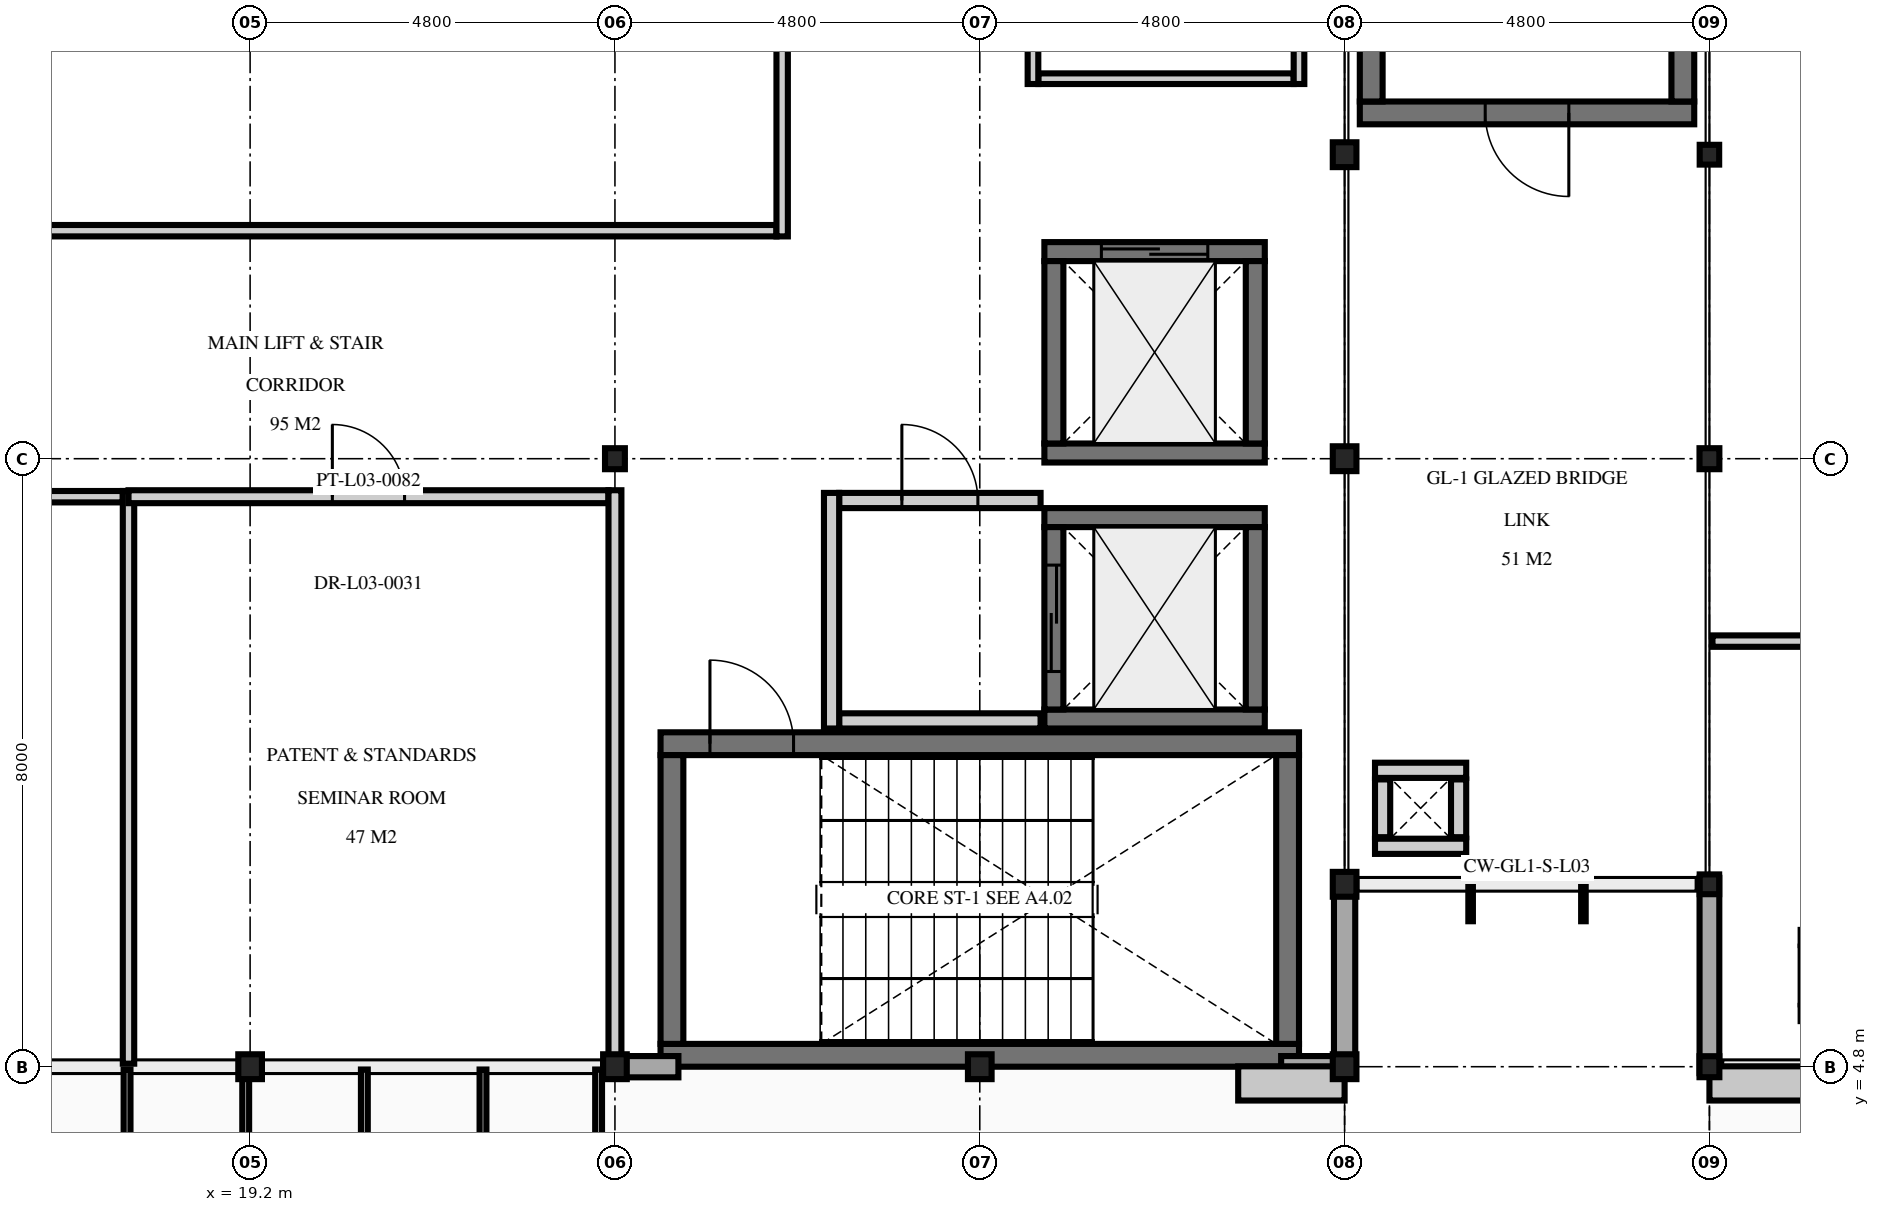
"""IFC4 building model, lengths in metres.
Left out: names, types, materials, properties, quantities, classifications, styles, units other than length and angle.
Written with IfcOpenShell. Run it as: python <this file> out.ifc"""

import sys

from ifc_helpers import new_model, si_unit, direction, frame, frame_2d, origin, origin_2d, place, context, subcontext, project, spatial, rectangle, i_section, extrude, element, fill, save


model = new_model("IFC4")
c1 = context("Model", 3, precision=1e-05, world=origin(), true_north=direction((0.0, 1.0)))
c2 = subcontext(c1, "Body", "Model", "MODEL_VIEW")
j1 = project(units=[si_unit("LENGTHUNIT", "METRE"), si_unit("PLANEANGLEUNIT", "RADIAN")], contexts=[c1])
p1 = place(None, origin())
s1 = spatial("IfcSite", under=j1, at=p1, CompositionType="ELEMENT")
p2 = place(p1, origin())
s2 = spatial("IfcBuilding", under=s1, at=p2, CompositionType="ELEMENT")
p3 = place(p2, frame((0.0, 0.0, 14.1)))
s3 = spatial("IfcBuildingStorey", under=s2, at=p3, CompositionType="ELEMENT", Elevation=14.1)
for number, where, z_axis, x_axis in (
    (1, (19.2, 4.8, 0.0), (0.0, 0.0, 1.0), (1.0, 0.0, 0.0)),
    (2, (24.0, 4.8, 0.0), (0.0, 0.0, 1.0), (1.0, 0.0, 0.0)),
    (3, (28.8, 4.8, 0.0), (0.0, 0.0, 1.0), (1.0, 0.0, 0.0)),
    (4, (33.6, 4.8, 0.0), (0.0, 0.0, 1.0), (1.0, 0.0, 0.0)),
    (5, (33.6, 7.2, 0.0), (0.0, 0.0, 1.0), (1.0, 0.0, 0.0)),
    (6, (33.6, 12.8, 0.0), (0.0, 0.0, 1.0), (1.0, 0.0, 0.0)),
    (7, (33.6, 16.8, 0.0), (0.0, 0.0, 1.0), (1.0, 0.0, 0.0)),
):
    element("IfcColumn", number, at=place(p3, frame(where, z_axis=z_axis, x_axis=x_axis)), inside=s3, PredefinedType="COLUMN", context=c2, shape_type="SweptSolid", body=[
        extrude(i_section(OverallWidth=0.311, OverallDepth=0.327, WebThickness=0.016, FlangeThickness=0.025, at=origin_2d()), origin(), (0.0, 0.0, 1.0), 4.5),
    ])
for number, where, z_axis, x_axis in (
    (8, (24.0, 12.8, 0.0), (0.0, 0.0, 1.0), (1.0, 0.0, 0.0)),
    (9, (38.4, 4.8, 0.0), (0.0, 0.0, 1.0), (1.0, 0.0, 0.0)),
    (10, (38.4, 12.8, 0.0), (0.0, 0.0, 1.0), (1.0, 0.0, 0.0)),
):
    element("IfcColumn", number, at=place(p3, frame(where, z_axis=z_axis, x_axis=x_axis)), inside=s3, PredefinedType="COLUMN", context=c2, shape_type="SweptSolid", body=[
        extrude(i_section(OverallWidth=0.261, OverallDepth=0.276, WebThickness=0.015, FlangeThickness=0.025, at=origin_2d()), origin(), (0.0, 0.0, 1.0), 4.5),
    ])
for number, where, z_axis, x_axis in (
    (11, (38.4, 7.2, 0.0), (0.0, 0.0, 1.0), (1.0, 0.0, 0.0)),
    (12, (38.4, 16.8, 0.0), (0.0, 0.0, 1.0), (1.0, 0.0, 0.0)),
):
    element("IfcColumn", number, at=place(p3, frame(where, z_axis=z_axis, x_axis=x_axis)), inside=s3, PredefinedType="COLUMN", context=c2, shape_type="SweptSolid", body=[
        extrude(i_section(OverallWidth=0.256, OverallDepth=0.26, WebThickness=0.01, FlangeThickness=0.017, at=origin_2d()), origin(), (0.0, 0.0, 1.0), 4.5),
    ])
p4 = place(p3, frame((33.0, 4.95, 0.0), z_axis=(0.0, 0.0, 1.0), x_axis=(-1.0, 0.0, 0.0)))
e13 = element("IfcWall", 13, at=p4, inside=s3, PredefinedType="SHEAR", context=c2, shape_type="SweptSolid", body=[
    extrude(rectangle(XDim=8.4, YDim=0.3, at=frame_2d((4.2, 0.0))), origin(), (0.0, 0.0, 1.0), 4.25),
])
p5 = place(p3, frame((24.6, 9.05, 0.0), z_axis=(0.0, 0.0, 1.0), x_axis=(1.0, 0.0, 0.0)))
e14 = element("IfcWall", 14, at=p5, inside=s3, PredefinedType="SHEAR", context=c2, shape_type="SweptSolid", body=[
    extrude(rectangle(XDim=8.4, YDim=0.3, at=frame_2d((4.2, 0.0))), origin(), (0.0, 0.0, 1.0), 4.25),
])
p6 = place(p5, frame((0.65, 0.0, 0.0)))
e15 = element("IfcOpeningElement", 15, at=p6, cuts=e14, PredefinedType="OPENING", context=c2, shape_type="SweptSolid", body=[
    extrude(rectangle(XDim=1.1, YDim=2.2, at=frame_2d((0.55, 1.1))), frame((0.0, 0.16, 0.0), z_axis=(0.0, -1.0, 0.0), x_axis=(1.0, 0.0, 0.0)), (0.0, 0.0, 1.0), 0.32),
])
for number, where, z_axis, x_axis in (
    (16, (24.75, 5.1, 0.0), (0.0, 0.0, 1.0), (0.0, 1.0, 0.0)),
    (17, (32.85, 8.9, 0.0), (0.0, 0.0, 1.0), (0.0, -1.0, 0.0)),
):
    element("IfcWall", number, at=place(p3, frame(where, z_axis=z_axis, x_axis=x_axis)), inside=s3, PredefinedType="SHEAR", context=c2, shape_type="SweptSolid", body=[
        extrude(rectangle(XDim=3.8, YDim=0.3, at=frame_2d((1.9, 0.0))), origin(), (0.0, 0.0, 1.0), 4.25),
    ])
p7 = place(p3, frame((38.2, 17.35, 0.0), z_axis=(0.0, 0.0, 1.0), x_axis=(-1.0, 0.0, 0.0)))
e18 = element("IfcWall", 18, at=p7, inside=s3, PredefinedType="SHEAR", context=c2, shape_type="SweptSolid", body=[
    extrude(rectangle(XDim=4.4, YDim=0.3, at=frame_2d((2.2, 0.0))), origin(), (0.0, 0.0, 1.0), 4.25),
])
p8 = place(p7, frame((1.65, 0.0, 0.0)))
e19 = element("IfcOpeningElement", 19, at=p8, cuts=e18, PredefinedType="OPENING", context=c2, shape_type="SweptSolid", body=[
    extrude(rectangle(XDim=1.1, YDim=2.2, at=frame_2d((0.55, 1.1))), frame((0.0, 0.16, 0.0), z_axis=(0.0, -1.0, 0.0), x_axis=(1.0, 0.0, 0.0)), (0.0, 0.0, 1.0), 0.32),
])
for number, where, z_axis, x_axis in (
    (20, (33.95, 17.5, 0.0), (0.0, 0.0, 1.0), (0.0, 1.0, 0.0)),
    (21, (38.05, 25.3, 0.0), (0.0, 0.0, 1.0), (0.0, -1.0, 0.0)),
):
    element("IfcWall", number, at=place(p3, frame(where, z_axis=z_axis, x_axis=x_axis)), inside=s3, PredefinedType="SHEAR", context=c2, shape_type="SweptSolid", body=[
        extrude(rectangle(XDim=7.8, YDim=0.3, at=frame_2d((3.9, 0.0))), origin(), (0.0, 0.0, 1.0), 4.25),
    ])
for number, where, z_axis, x_axis in (
    (22, (32.55, 9.375, 0.0), (0.0, 0.0, 1.0), (-1.0, 0.0, 0.0)),
    (23, (29.65, 12.025, 0.0), (0.0, 0.0, 1.0), (1.0, 0.0, 0.0)),
):
    element("IfcWall", number, at=place(p3, frame(where, z_axis=z_axis, x_axis=x_axis)), inside=s3, PredefinedType="SHEAR", context=c2, shape_type="SweptSolid", body=[
        extrude(rectangle(XDim=2.9, YDim=0.25, at=frame_2d((1.45, 0.0))), origin(), (0.0, 0.0, 1.0), 4.25),
    ])
p9 = place(p3, frame((29.775, 9.5, 0.0), z_axis=(0.0, 0.0, 1.0), x_axis=(0.0, 1.0, 0.0)))
e24 = element("IfcWall", 24, at=p9, inside=s3, PredefinedType="SHEAR", context=c2, shape_type="SweptSolid", body=[
    extrude(rectangle(XDim=2.4, YDim=0.25, at=frame_2d((1.2, 0.0))), origin(), (0.0, 0.0, 1.0), 4.25),
])
p10 = place(p9, frame((0.5, 0.0, 0.0)))
e25 = element("IfcOpeningElement", 25, at=p10, cuts=e24, PredefinedType="OPENING", context=c2, shape_type="SweptSolid", body=[
    extrude(rectangle(XDim=1.4, YDim=2.2, at=frame_2d((0.7, 1.1))), frame((0.0, 0.135, 0.0), z_axis=(0.0, -1.0, 0.0), x_axis=(1.0, 0.0, 0.0)), (0.0, 0.0, 1.0), 0.27),
])
p11 = place(p3, frame((32.425, 11.9, 0.0), z_axis=(0.0, 0.0, 1.0), x_axis=(0.0, -1.0, 0.0)))
e26 = element("IfcWall", 26, at=p11, inside=s3, PredefinedType="SHEAR", context=c2, shape_type="SweptSolid", body=[
    extrude(rectangle(XDim=2.4, YDim=0.25, at=frame_2d((1.2, 0.0))), origin(), (0.0, 0.0, 1.0), 4.25),
])
p12 = place(p3, frame((32.55, 12.875, 0.0), z_axis=(0.0, 0.0, 1.0), x_axis=(-1.0, 0.0, 0.0)))
e27 = element("IfcWall", 27, at=p12, inside=s3, PredefinedType="SHEAR", context=c2, shape_type="SweptSolid", body=[
    extrude(rectangle(XDim=2.9, YDim=0.25, at=frame_2d((1.45, 0.0))), origin(), (0.0, 0.0, 1.0), 4.25),
])
p13 = place(p3, frame((29.65, 15.525, 0.0), z_axis=(0.0, 0.0, 1.0), x_axis=(1.0, 0.0, 0.0)))
e28 = element("IfcWall", 28, at=p13, inside=s3, PredefinedType="SHEAR", context=c2, shape_type="SweptSolid", body=[
    extrude(rectangle(XDim=2.9, YDim=0.25, at=frame_2d((1.45, 0.0))), origin(), (0.0, 0.0, 1.0), 4.25),
])
p14 = place(p13, frame((0.75, 0.0, 0.0)))
e29 = element("IfcOpeningElement", 29, at=p14, cuts=e28, PredefinedType="OPENING", context=c2, shape_type="SweptSolid", body=[
    extrude(rectangle(XDim=1.4, YDim=2.2, at=frame_2d((0.7, 1.1))), frame((0.0, 0.135, 0.0), z_axis=(0.0, -1.0, 0.0), x_axis=(1.0, 0.0, 0.0)), (0.0, 0.0, 1.0), 0.27),
])
for number, where, z_axis, x_axis in (
    (30, (29.775, 13.0, 0.0), (0.0, 0.0, 1.0), (0.0, 1.0, 0.0)),
    (31, (32.425, 15.4, 0.0), (0.0, 0.0, 1.0), (0.0, -1.0, 0.0)),
):
    element("IfcWall", number, at=place(p3, frame(where, z_axis=z_axis, x_axis=x_axis)), inside=s3, PredefinedType="SHEAR", context=c2, shape_type="SweptSolid", body=[
        extrude(rectangle(XDim=2.4, YDim=0.25, at=frame_2d((1.2, 0.0))), origin(), (0.0, 0.0, 1.0), 4.25),
    ])
p15 = place(p3, frame((40.8, 5.5, 0.0), z_axis=(0.0, 0.0, 1.0), x_axis=(-1.0, 0.0, 0.0)))
e32 = element("IfcWall", 32, at=p15, inside=s3, PredefinedType="PARTITIONING", context=c2, shape_type="SweptSolid", body=[
    extrude(rectangle(XDim=1.2, YDim=0.2, at=frame_2d((0.6, 0.0))), origin(), (0.0, 0.0, 1.0), 3.75),
])
p16 = place(p3, frame((39.7, 5.62, 0.0), z_axis=(0.0, 0.0, 1.0), x_axis=(0.0, 1.0, 0.0)))
e33 = element("IfcWall", 33, at=p16, inside=s3, PredefinedType="PARTITIONING", context=c2, shape_type="SweptSolid", body=[
    extrude(rectangle(XDim=0.76, YDim=0.2, at=frame_2d((0.38, 0.0))), origin(), (0.0, 0.0, 1.0), 3.75),
])
for number, where, z_axis, x_axis in (
    (34, (35.2, 7.7, 0.0), (0.0, 0.0, 1.0), (-1.0, 0.0, 0.0)),
    (35, (34.0, 8.7, 0.0), (0.0, 0.0, 1.0), (1.0, 0.0, 0.0)),
):
    element("IfcWall", number, at=place(p3, frame(where, z_axis=z_axis, x_axis=x_axis)), inside=s3, PredefinedType="PARTITIONING", context=c2, shape_type="SweptSolid", body=[
        extrude(rectangle(XDim=1.2, YDim=0.2, at=frame_2d((0.6, 0.0))), origin(), (0.0, 0.0, 1.0), 3.75),
    ])
for number, where, z_axis, x_axis in (
    (36, (34.1, 7.82, 0.0), (0.0, 0.0, 1.0), (0.0, 1.0, 0.0)),
    (37, (35.1, 8.58, 0.0), (0.0, 0.0, 1.0), (0.0, -1.0, 0.0)),
):
    element("IfcWall", number, at=place(p3, frame(where, z_axis=z_axis, x_axis=x_axis)), inside=s3, PredefinedType="PARTITIONING", context=c2, shape_type="SweptSolid", body=[
        extrude(rectangle(XDim=0.76, YDim=0.2, at=frame_2d((0.38, 0.0))), origin(), (0.0, 0.0, 1.0), 3.75),
    ])
p17 = place(p3, frame((24.835, 4.8, 0.0), z_axis=(0.0, 0.0, 1.0), x_axis=(-1.0, 0.0, 0.0)))
e38 = element("IfcWall", 38, at=p17, inside=s3, PredefinedType="SOLIDWALL", context=c2, shape_type="SweptSolid", body=[
    extrude(rectangle(XDim=0.92, YDim=0.28, at=frame_2d((0.46, 0.0))), origin(), (0.0, 0.0, 1.0), 3.675),
])
p18 = place(p3, frame((33.685, 4.8, 0.0), z_axis=(0.0, 0.0, 1.0), x_axis=(-1.0, 0.0, 0.0)))
e39 = element("IfcWall", 39, at=p18, inside=s3, PredefinedType="SOLIDWALL", context=c2, shape_type="SweptSolid", body=[
    extrude(rectangle(XDim=0.92, YDim=0.28, at=frame_2d((0.46, 0.0))), origin(), (0.0, 0.0, 1.0), 3.675),
])
p19 = place(p3, frame((33.6, 7.285, 0.0), z_axis=(0.0, 0.0, 1.0), x_axis=(0.0, -1.0, 0.0)))
e40 = element("IfcWall", 40, at=p19, inside=s3, PredefinedType="SOLIDWALL", context=c2, shape_type="SweptSolid", body=[
    extrude(rectangle(XDim=2.57, YDim=0.28, at=frame_2d((1.285, 0.0))), origin(), (0.0, 0.0, 1.0), 3.675),
])
p20 = place(p3, frame((38.4, 4.715, 0.0), z_axis=(0.0, 0.0, 1.0), x_axis=(0.0, 1.0, 0.0)))
e41 = element("IfcWall", 41, at=p20, inside=s3, PredefinedType="SOLIDWALL", context=c2, shape_type="SweptSolid", body=[
    extrude(rectangle(XDim=2.57, YDim=0.26, at=frame_2d((1.285, 0.0))), origin(), (0.0, 0.0, 1.0), 3.835),
])
p21 = place(p3, frame((26.95, 9.35, 0.0), z_axis=(0.0, 0.0, 1.0), x_axis=(1.0, 0.0, 0.0)))
e42 = element("IfcWall", 42, at=p21, inside=s3, PredefinedType="PARTITIONING", context=c2, shape_type="SweptSolid", body=[
    extrude(rectangle(XDim=2.65, YDim=0.2, at=frame_2d((1.325, 0.0))), origin(), (0.0, 0.0, 1.0), 4.25),
])
p22 = place(p3, frame((26.95, 12.25, 0.0), z_axis=(0.0, 0.0, 1.0), x_axis=(1.0, 0.0, 0.0)))
e43 = element("IfcWall", 43, at=p22, inside=s3, PredefinedType="PARTITIONING", context=c2, shape_type="SweptSolid", body=[
    extrude(rectangle(XDim=2.65, YDim=0.2, at=frame_2d((1.325, 0.0))), origin(), (0.0, 0.0, 1.0), 4.25),
])
p23 = place(p22, frame((0.825, 0.0, 0.0)))
e44 = element("IfcOpeningElement", 44, at=p23, cuts=e43, PredefinedType="OPENING", context=c2, shape_type="SweptSolid", body=[
    extrude(rectangle(XDim=1.0, YDim=2.2, at=frame_2d((0.5, 1.1))), frame((0.0, 0.11, 0.0), z_axis=(0.0, -1.0, 0.0), x_axis=(1.0, 0.0, 0.0)), (0.0, 0.0, 1.0), 0.22),
])
p24 = place(p3, frame((26.85, 9.25, 0.0), z_axis=(0.0, 0.0, 1.0), x_axis=(0.0, 1.0, 0.0)))
e45 = element("IfcWall", 45, at=p24, inside=s3, PredefinedType="PARTITIONING", context=c2, shape_type="SweptSolid", body=[
    extrude(rectangle(XDim=3.1, YDim=0.2, at=frame_2d((1.55, 0.0))), origin(), (0.0, 0.0, 1.0), 4.25),
])
p25 = place(p3, frame((29.57, 17.8, 0.0), z_axis=(0.0, 0.0, 1.0), x_axis=(1.0, 0.0, 0.0)))
e46 = element("IfcWall", 46, at=p25, inside=s3, PredefinedType="PARTITIONING", context=c2, shape_type="SweptSolid", body=[
    extrude(rectangle(XDim=3.36, YDim=0.14, at=frame_2d((1.68, 0.0))), origin(), (0.0, 0.0, 1.0), 3.625),
])
p26 = place(p3, frame((29.5, 17.73, 0.0), z_axis=(0.0, 0.0, 1.0), x_axis=(0.0, 1.0, 0.0)))
e47 = element("IfcWall", 47, at=p26, inside=s3, PredefinedType="PARTITIONING", context=c2, shape_type="SweptSolid", body=[
    extrude(rectangle(XDim=4.24, YDim=0.14, at=frame_2d((2.12, 0.0))), origin(), (0.0, 0.0, 1.0), 3.675),
])
p27 = place(p26, frame((1.645, 0.0, 0.0)))
e48 = element("IfcOpeningElement", 48, at=p27, cuts=e47, PredefinedType="OPENING", context=c2, shape_type="SweptSolid", body=[
    extrude(rectangle(XDim=0.95, YDim=2.1, at=frame_2d((0.475, 1.05))), frame((0.0, 0.08, 0.0), z_axis=(0.0, -1.0, 0.0), x_axis=(1.0, 0.0, 0.0)), (0.0, 0.0, 1.0), 0.16),
])
p28 = place(p3, frame((33.0, 17.73, 0.0), z_axis=(0.0, 0.0, 1.0), x_axis=(0.0, 1.0, 0.0)))
e49 = element("IfcWall", 49, at=p28, inside=s3, PredefinedType="PARTITIONING", context=c2, shape_type="SweptSolid", body=[
    extrude(rectangle(XDim=4.24, YDim=0.14, at=frame_2d((2.12, 0.0))), origin(), (0.0, 0.0, 1.0), 3.675),
])
p29 = place(p3, frame((0.04, 12.3, 0.0), z_axis=(0.0, 0.0, 1.0), x_axis=(1.0, 0.0, 0.0)))
e50 = element("IfcWall", 50, at=p29, inside=s3, PredefinedType="PARTITIONING", context=c2, shape_type="SweptSolid", body=[
    extrude(rectangle(XDim=17.485, YDim=0.15, at=frame_2d((8.742, 0.0))), origin(), (0.0, 0.0, 1.0), 3.625),
])
p30 = place(p29, frame((7.268, 0.0, 0.0)))
e51 = element("IfcOpeningElement", 51, at=p30, cuts=e50, PredefinedType="OPENING", context=c2, shape_type="SweptSolid", body=[
    extrude(rectangle(XDim=0.95, YDim=2.15, at=frame_2d((0.475, 1.075))), frame((0.0, 0.085, 0.0), z_axis=(0.0, -1.0, 0.0), x_axis=(1.0, 0.0, 0.0)), (0.0, 0.0, 1.0), 0.17),
])
p31 = place(p3, frame((17.6, 4.84, 0.0), z_axis=(0.0, 0.0, 1.0), x_axis=(0.0, 1.0, 0.0)))
e52 = element("IfcWall", 52, at=p31, inside=s3, PredefinedType="PARTITIONING", context=c2, shape_type="SweptSolid", body=[
    extrude(rectangle(XDim=7.535, YDim=0.15, at=frame_2d((3.768, 0.0))), origin(), (0.0, 0.0, 1.0), 3.675),
])
p32 = place(p3, frame((17.6, 12.3, 0.0), z_axis=(0.0, 0.0, 1.0), x_axis=(1.0, 0.0, 0.0)))
e53 = element("IfcWall", 53, at=p32, inside=s3, PredefinedType="PARTITIONING", context=c2, shape_type="SweptSolid", body=[
    extrude(rectangle(XDim=6.315, YDim=0.17, at=frame_2d((3.157, 0.0))), origin(), (0.0, 0.0, 1.0), 3.625),
])
p33 = place(p32, frame((2.682, 0.0, 0.0)))
e54 = element("IfcOpeningElement", 54, at=p33, cuts=e53, PredefinedType="OPENING", context=c2, shape_type="SweptSolid", body=[
    extrude(rectangle(XDim=0.95, YDim=2.15, at=frame_2d((0.475, 1.075))), frame((0.0, 0.095, 0.0), z_axis=(0.0, -1.0, 0.0), x_axis=(1.0, 0.0, 0.0)), (0.0, 0.0, 1.0), 0.19),
])
p34 = place(p3, frame((24.0, 4.84, 0.0), z_axis=(0.0, 0.0, 1.0), x_axis=(0.0, 1.0, 0.0)))
e55 = element("IfcWall", 55, at=p34, inside=s3, PredefinedType="PARTITIONING", context=c2, shape_type="SweptSolid", body=[
    extrude(rectangle(XDim=7.545, YDim=0.17, at=frame_2d((3.772, 0.0))), origin(), (0.0, 0.0, 1.0), 3.675),
])
p35 = place(p3, frame((9.675, 15.8, 0.0), z_axis=(0.0, 0.0, 1.0), x_axis=(1.0, 0.0, 0.0)))
e56 = element("IfcWall", 56, at=p35, inside=s3, PredefinedType="PARTITIONING", context=c2, shape_type="SweptSolid", body=[
    extrude(rectangle(XDim=16.45, YDim=0.15, at=frame_2d((8.225, 0.0))), origin(), (0.0, 0.0, 1.0), 3.625),
])
p36 = place(p3, frame((26.2, 15.725, 0.0), z_axis=(0.0, 0.0, 1.0), x_axis=(0.0, 1.0, 0.0)))
e57 = element("IfcWall", 57, at=p36, inside=s3, PredefinedType="PARTITIONING", context=c2, shape_type="SweptSolid", body=[
    extrude(rectangle(XDim=21.035, YDim=0.15, at=frame_2d((10.518, 0.0))), origin(), (0.0, 0.0, 1.0), 3.675),
])
p37 = place(p3, frame((38.44, 10.4, 0.0), z_axis=(0.0, 0.0, 1.0), x_axis=(1.0, 0.0, 0.0)))
e58 = element("IfcWall", 58, at=p37, inside=s3, PredefinedType="PARTITIONING", context=c2, shape_type="SweptSolid", body=[
    extrude(rectangle(XDim=9.485, YDim=0.15, at=frame_2d((4.743, 0.0))), origin(), (0.0, 0.0, 1.0), 3.862),
])
p38 = place(p37, frame((4.268, 0.0, 0.0)))
e59 = element("IfcOpeningElement", 59, at=p38, cuts=e58, PredefinedType="OPENING", context=c2, shape_type="SweptSolid", body=[
    extrude(rectangle(XDim=0.95, YDim=2.15, at=frame_2d((0.475, 1.075))), frame((0.0, 0.085, 0.0), z_axis=(0.0, -1.0, 0.0), x_axis=(1.0, 0.0, 0.0)), (0.0, 0.0, 1.0), 0.17),
])
p39 = place(p6, origin())
e60 = element("IfcDoor", 60, at=p39, inside=s3, OperationType="SINGLE_SWING_LEFT", PredefinedType="DOOR", context=c2, shape_type="SweptSolid", body=[
    extrude(rectangle(XDim=1.1, YDim=2.2, at=frame_2d((0.55, 1.1))), frame((0.0, 0.025, 0.0), z_axis=(0.0, -1.0, 0.0), x_axis=(1.0, 0.0, 0.0)), (0.0, 0.0, 1.0), 0.05),
])
fill(e15, e60)
p40 = place(p8, origin())
e61 = element("IfcDoor", 61, at=p40, inside=s3, OperationType="SINGLE_SWING_LEFT", PredefinedType="DOOR", context=c2, shape_type="SweptSolid", body=[
    extrude(rectangle(XDim=1.1, YDim=2.2, at=frame_2d((0.55, 1.1))), frame((0.0, 0.025, 0.0), z_axis=(0.0, -1.0, 0.0), x_axis=(1.0, 0.0, 0.0)), (0.0, 0.0, 1.0), 0.05),
])
fill(e19, e61)
p41 = place(p10, origin())
e62 = element("IfcDoor", 62, at=p41, inside=s3, OperationType="DOUBLE_DOOR_SLIDING", PredefinedType="DOOR", context=c2, shape_type="SweptSolid", body=[
    extrude(rectangle(XDim=1.4, YDim=2.2, at=frame_2d((0.7, 1.1))), frame((0.0, 0.025, 0.0), z_axis=(0.0, -1.0, 0.0), x_axis=(1.0, 0.0, 0.0)), (0.0, 0.0, 1.0), 0.05),
])
fill(e25, e62)
p42 = place(p14, origin())
e63 = element("IfcDoor", 63, at=p42, inside=s3, OperationType="DOUBLE_DOOR_SLIDING", PredefinedType="DOOR", context=c2, shape_type="SweptSolid", body=[
    extrude(rectangle(XDim=1.4, YDim=2.2, at=frame_2d((0.7, 1.1))), frame((0.0, 0.025, 0.0), z_axis=(0.0, -1.0, 0.0), x_axis=(1.0, 0.0, 0.0)), (0.0, 0.0, 1.0), 0.05),
])
fill(e29, e63)
p43 = place(p23, origin())
e64 = element("IfcDoor", 64, at=p43, inside=s3, OperationType="SINGLE_SWING_LEFT", PredefinedType="DOOR", context=c2, shape_type="SweptSolid", body=[
    extrude(rectangle(XDim=1.0, YDim=2.2, at=frame_2d((0.5, 1.1))), frame((0.0, 0.025, 0.0), z_axis=(0.0, -1.0, 0.0), x_axis=(1.0, 0.0, 0.0)), (0.0, 0.0, 1.0), 0.05),
])
fill(e44, e64)
p44 = place(p33, origin())
e65 = element("IfcDoor", 65, at=p44, inside=s3, OperationType="SINGLE_SWING_LEFT", PredefinedType="DOOR", context=c2, shape_type="SweptSolid", body=[
    extrude(rectangle(XDim=0.95, YDim=2.15, at=frame_2d((0.475, 1.075))), frame((0.0, 0.025, 0.0), z_axis=(0.0, -1.0, 0.0), x_axis=(1.0, 0.0, 0.0)), (0.0, 0.0, 1.0), 0.05),
])
fill(e54, e65)
save(model, sys.argv[1])
